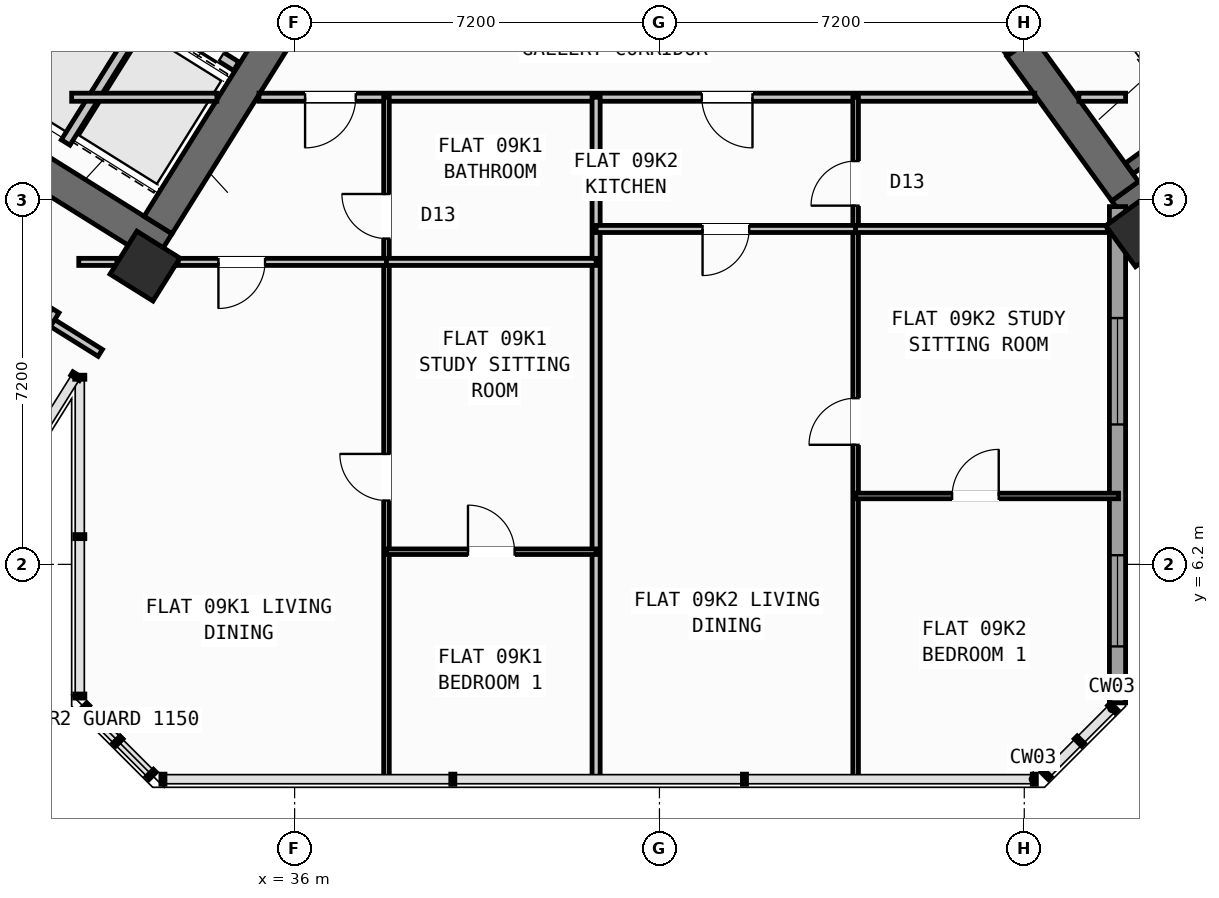
"""IFC4 building model, lengths in metres.
Left out: names, types, materials, properties, quantities, classifications, styles, units other than length and angle.
Written with IfcOpenShell. Run it as: python <this file> out.ifc"""

import sys

from ifc_helpers import new_model, si_unit, direction, frame, frame_2d, origin, origin_2d, place, context, subcontext, project, spatial, rectangle, hollow_rectangle, extrude, source, transform, mapped, element, fill, save


model = new_model("IFC4")
c1 = context("Model", 3, precision=1e-05, world=origin(), true_north=direction((0.0, 1.0)))
c2 = subcontext(c1, "Body", "Model", "MODEL_VIEW")
j1 = project(units=[si_unit("LENGTHUNIT", "METRE"), si_unit("PLANEANGLEUNIT", "RADIAN")], contexts=[c1])
p1 = place(None, origin())
s1 = spatial("IfcSite", under=j1, at=p1, CompositionType="ELEMENT")
p2 = place(p1, origin())
s2 = spatial("IfcBuilding", under=s1, at=p2, CompositionType="ELEMENT")
p3 = place(p2, frame((0.0, 0.0, 38.4)))
s3 = spatial("IfcBuildingStorey", under=s2, at=p3, CompositionType="ELEMENT", Elevation=38.4)
p4 = place(p3, frame((33.409, 12.45, 0.0), z_axis=(0.0, 0.0, 1.0), x_axis=(-0.848051132073, 0.529914405721, 0.0)))
e1 = element("IfcWall", 1, at=p4, inside=s3, PredefinedType="SHEAR", context=c2, shape_type="SweptSolid", body=[
    extrude(rectangle(XDim=13.24, YDim=0.65, at=frame_2d((6.62, 0.0))), origin(), (0.0, 0.0, 1.0), 3.35),
])
p5 = place(p3, frame((36.683, 18.304, 0.0), z_axis=(0.0, 0.0, 1.0), x_axis=(-0.529899109053, -0.848060690178, 0.0)))
e2 = element("IfcWall", 2, at=p5, inside=s3, PredefinedType="SHEAR", context=c2, shape_type="SweptSolid", body=[
    extrude(rectangle(XDim=6.375, YDim=0.65, at=frame_2d((3.188, 0.0))), origin(), (0.0, 0.0, 1.0), 3.35),
])
p6 = place(p3, frame((52.318, 13.11, 0.0), z_axis=(0.0, 0.0, 1.0), x_axis=(0.809019445368, 0.587781878776, 0.0)))
e3 = element("IfcWall", 3, at=p6, inside=s3, PredefinedType="SHEAR", context=c2, shape_type="SweptSolid", body=[
    extrude(rectangle(XDim=12.44, YDim=0.65, at=frame_2d((6.22, 0.0))), origin(), (0.0, 0.0, 1.0), 3.35),
])
p7 = place(p3, frame((52.39, 13.564, 0.0), z_axis=(0.0, 0.0, 1.0), x_axis=(-0.58779688989, 0.809008539037, 0.0)))
e4 = element("IfcWall", 4, at=p7, inside=s3, PredefinedType="SHEAR", context=c2, shape_type="SweptSolid", body=[
    extrude(rectangle(XDim=3.525, YDim=0.65, at=frame_2d((1.763, 0.0))), origin(), (0.0, 0.0, 1.0), 3.35),
])
m1 = source(origin(), c2, "Body", "SweptSolid", [
    extrude(hollow_rectangle(XDim=1.0, YDim=1.0, WallThickness=0.04, at=origin_2d()), origin(), (0.0, 0.0, 1.0), 3.6),
])
for number, where, z_axis, x_axis in (
    (5, (33.046, 12.087, 0.0), (0.0, 0.0, 1.0), (-0.848, 0.53, 0.0)),
    (6, (52.705, 12.773, 0.0), (0.0, 0.0, 1.0), (0.809, 0.588, 0.0)),
):
    element("IfcColumn", number, at=place(p3, frame(where, z_axis=z_axis, x_axis=x_axis)), inside=s3, PredefinedType="COLUMN", context=c2, shape_type="MappedRepresentation", body=[
        mapped(m1, transform((0.0, 0.0, 0.0), scale=1.0)),
    ])
p8 = place(p3, frame((56.581, 7.439, 0.0), z_axis=(0.0, 0.0, 1.0), x_axis=(-0.587785875463, 0.809016541614, 0.0)))
e7 = element("IfcWall", 7, at=p8, inside=s3, PredefinedType="STANDARD", context=c2, shape_type="SweptSolid", body=[
    extrude(rectangle(XDim=6.774, YDim=0.32, at=frame_2d((3.387, 0.0))), origin(), (0.0, 0.0, 1.0), 2.725),
])
p9 = place(p8, frame((1.556, 0.0, 0.8)))
e8 = element("IfcOpeningElement", 8, at=p9, cuts=e7, PredefinedType="OPENING", context=c2, shape_type="SweptSolid", body=[
    extrude(rectangle(XDim=2.1, YDim=1.55, at=frame_2d((1.05, 0.775))), frame((0.0, 0.17, 0.0), z_axis=(0.0, -1.0, 0.0), x_axis=(1.0, 0.0, 0.0)), (0.0, 0.0, 1.0), 0.34),
])
p10 = place(p3, frame((52.24, 13.261, 0.0), z_axis=(0.0, 0.0, 1.0), x_axis=(0.0, -1.0, 0.0)))
e9 = element("IfcWall", 9, at=p10, inside=s3, PredefinedType="STANDARD", context=c2, shape_type="SweptSolid", body=[
    extrude(rectangle(XDim=9.795, YDim=0.32, at=frame_2d((4.897, 0.0))), origin(), (0.0, 0.0, 1.0), 3.35),
])
p11 = place(p10, frame((2.199, 0.0, 0.8)))
e10 = element("IfcOpeningElement", 10, at=p11, cuts=e9, PredefinedType="OPENING", context=c2, shape_type="SweptSolid", body=[
    extrude(rectangle(XDim=2.1, YDim=1.55, at=frame_2d((1.05, 0.775))), frame((0.0, 0.17, 0.0), z_axis=(0.0, -1.0, 0.0), x_axis=(1.0, 0.0, 0.0)), (0.0, 0.0, 1.0), 0.34),
])
p12 = place(p10, frame((6.88, 0.0, 0.85)))
e11 = element("IfcOpeningElement", 11, at=p12, cuts=e9, PredefinedType="OPENING", context=c2, shape_type="SweptSolid", body=[
    extrude(rectangle(XDim=1.8, YDim=1.5, at=frame_2d((0.9, 0.75))), frame((0.0, 0.17, 0.0), z_axis=(0.0, -1.0, 0.0), x_axis=(1.0, 0.0, 0.0)), (0.0, 0.0, 1.0), 0.34),
])
p13 = place(p3, frame((31.288, 18.256, 0.0), z_axis=(0.0, 0.0, 1.0), x_axis=(-0.529943379326, -0.848033026897, 0.0)))
e12 = element("IfcWall", 12, at=p13, inside=s3, PredefinedType="SHEAR", context=c2, shape_type="SweptSolid", body=[
    extrude(rectangle(XDim=3.16, YDim=0.26, at=frame_2d((1.58, 0.0))), origin(), (0.0, 0.0, 1.0), 3.35),
])
p14 = place(p3, frame((34.848, 16.031, 0.0), z_axis=(0.0, 0.0, 1.0), x_axis=(-0.848044042236, 0.529925751807, 0.0)))
e13 = element("IfcWall", 13, at=p14, inside=s3, PredefinedType="STANDARD", context=c2, shape_type="SweptSolid", body=[
    extrude(rectangle(XDim=4.198, YDim=0.2, at=frame_2d((2.099, 0.0))), origin(), (0.0, 0.0, 1.0), 3.34),
])
p15 = place(p14, frame((0.348, 0.0, 0.0)))
e14 = element("IfcOpeningElement", 14, at=p15, cuts=e13, PredefinedType="OPENING", context=c2, shape_type="SweptSolid", body=[
    extrude(rectangle(XDim=1.3, YDim=2.2, at=frame_2d((0.65, 1.1))), frame((0.0, 0.11, 0.0), z_axis=(0.0, -1.0, 0.0), x_axis=(1.0, 0.0, 0.0)), (0.0, 0.0, 1.0), 0.22),
])
p16 = place(p14, frame((2.423, 0.0, 0.0)))
e15 = element("IfcOpeningElement", 15, at=p16, cuts=e13, PredefinedType="OPENING", context=c2, shape_type="SweptSolid", body=[
    extrude(rectangle(XDim=1.45, YDim=2.25, at=frame_2d((0.725, 1.125))), frame((0.0, 0.11, 0.0), z_axis=(0.0, -1.0, 0.0), x_axis=(1.0, 0.0, 0.0)), (0.0, 0.0, 1.0), 0.22),
])
p17 = place(p3, frame((33.029, 17.003, 0.0), z_axis=(0.0, 0.0, 1.0), x_axis=(-0.529916267533, -0.848049968695, 0.0)))
e16 = element("IfcWall", 16, at=p17, inside=s3, PredefinedType="STANDARD", context=c2, shape_type="SweptSolid", body=[
    extrude(rectangle(XDim=2.92, YDim=0.2, at=frame_2d((1.46, 0.0))), origin(), (0.0, 0.0, 1.0), 3.34),
])
p18 = place(p3, frame((52.472, 14.013, 0.0), z_axis=(0.0, 0.0, 1.0), x_axis=(0.809028366311, 0.587769599847, 0.0)))
e17 = element("IfcWall", 17, at=p18, inside=s3, PredefinedType="SHEAR", context=c2, shape_type="SweptSolid", body=[
    extrude(rectangle(XDim=7.33, YDim=0.26, at=frame_2d((3.665, 0.0))), origin(), (0.0, 0.0, 1.0), 3.35),
])
p19 = place(p3, frame((32.164, 10.374, 0.0), z_axis=(0.0, 0.0, 1.0), x_axis=(-0.848044107957, 0.529925646633, 0.0)))
e18 = element("IfcWall", 18, at=p19, inside=s3, PredefinedType="PARTITIONING", context=c2, shape_type="SweptSolid", body=[
    extrude(rectangle(XDim=15.57, YDim=0.16, at=frame_2d((7.785, 0.0))), origin(), (0.0, 0.0, 1.0), 3.34),
])
p20 = place(p19, frame((10.83, 0.0, 0.0)))
e19 = element("IfcOpeningElement", 19, at=p20, cuts=e18, PredefinedType="OPENING", context=c2, shape_type="SweptSolid", body=[
    extrude(rectangle(XDim=1.0, YDim=2.1, at=frame_2d((0.5, 1.05))), frame((0.0, 0.09, 0.0), z_axis=(0.0, -1.0, 0.0), x_axis=(1.0, 0.0, 0.0)), (0.0, 0.0, 1.0), 0.18),
])
p21 = place(p3, frame((31.282, 11.208, 0.0), z_axis=(0.0, 0.0, 1.0), x_axis=(-0.529938869374, -0.84803584519, 0.0)))
e20 = element("IfcWall", 20, at=p21, inside=s3, PredefinedType="PARTITIONING", context=c2, shape_type="SweptSolid", body=[
    extrude(rectangle(XDim=5.48, YDim=0.16, at=frame_2d((2.74, 0.0))), origin(), (0.0, 0.0, 1.0), 3.34),
])
p22 = place(p3, frame((31.6, 15.42, 0.0), z_axis=(0.0, 0.0, 1.0), x_axis=(1.0, 0.0, 0.0)))
e21 = element("IfcWall", 21, at=p22, inside=s3, PredefinedType="PARTITIONING", context=c2, shape_type="SweptSolid", body=[
    extrude(rectangle(XDim=2.866, YDim=0.16, at=frame_2d((1.433, 0.0))), origin(), (0.0, 0.0, 1.0), 3.34),
])
p23 = place(p3, frame((35.296, 15.42, 0.0), z_axis=(0.0, 0.0, 1.0), x_axis=(1.0, 0.0, 0.0)))
e22 = element("IfcWall", 22, at=p23, inside=s3, PredefinedType="PARTITIONING", context=c2, shape_type="SweptSolid", body=[
    extrude(rectangle(XDim=15.311, YDim=0.16, at=frame_2d((7.655, 0.0))), origin(), (0.0, 0.0, 1.0), 3.34),
])
p24 = place(p23, frame((0.91, 0.0, 0.0)))
e23 = element("IfcOpeningElement", 23, at=p24, cuts=e22, PredefinedType="OPENING", context=c2, shape_type="SweptSolid", body=[
    extrude(rectangle(XDim=1.0, YDim=2.1, at=frame_2d((0.5, 1.05))), frame((0.0, 0.09, 0.0), z_axis=(0.0, -1.0, 0.0), x_axis=(1.0, 0.0, 0.0)), (0.0, 0.0, 1.0), 0.18),
])
p25 = place(p23, frame((8.74, 0.0, 0.0)))
e24 = element("IfcOpeningElement", 24, at=p25, cuts=e22, PredefinedType="OPENING", context=c2, shape_type="SweptSolid", body=[
    extrude(rectangle(XDim=1.0, YDim=2.1, at=frame_2d((0.5, 1.05))), frame((0.0, 0.09, 0.0), z_axis=(0.0, -1.0, 0.0), x_axis=(1.0, 0.0, 0.0)), (0.0, 0.0, 1.0), 0.18),
])
p26 = place(p3, frame((51.477, 15.42, 0.0), z_axis=(0.0, 0.0, 1.0), x_axis=(1.0, 0.0, 0.0)))
e25 = element("IfcWall", 25, at=p26, inside=s3, PredefinedType="PARTITIONING", context=c2, shape_type="SweptSolid", body=[
    extrude(rectangle(XDim=0.923, YDim=0.16, at=frame_2d((0.461, 0.0))), origin(), (0.0, 0.0, 1.0), 3.34),
])
p27 = place(p3, frame((50.119, 16.333, 0.0), z_axis=(0.0, 0.0, 1.0), x_axis=(-0.587749856981, 0.809042709391, 0.0)))
e26 = element("IfcWall", 26, at=p27, inside=s3, PredefinedType="STANDARD", context=c2, shape_type="SweptSolid", body=[
    extrude(rectangle(XDim=2.96, YDim=0.2, at=frame_2d((1.48, 0.0))), origin(), (0.0, 0.0, 1.0), 3.34),
])
p28 = place(p27, frame((0.53, 0.0, 0.0)))
e27 = element("IfcOpeningElement", 27, at=p28, cuts=e26, PredefinedType="OPENING", context=c2, shape_type="SweptSolid", body=[
    extrude(rectangle(XDim=1.5, YDim=2.15, at=frame_2d((0.75, 1.075))), frame((0.0, 0.11, 0.0), z_axis=(0.0, -1.0, 0.0), x_axis=(1.0, 0.0, 0.0)), (0.0, 0.0, 1.0), 0.22),
])
p29 = place(p3, frame((41.95, 1.96, 0.0), z_axis=(0.0, 0.0, 1.0), x_axis=(0.0, 1.0, 0.0)))
e28 = element("IfcWall", 28, at=p29, inside=s3, PredefinedType="PARTITIONING", context=c2, shape_type="SweptSolid", body=[
    extrude(rectangle(XDim=13.46, YDim=0.16, at=frame_2d((6.73, 0.0))), origin(), (0.0, 0.0, 1.0), 3.34),
])
p30 = place(p3, frame((37.813, 1.96, 0.0), z_axis=(0.0, 0.0, 1.0), x_axis=(0.0, 1.0, 0.0)))
e29 = element("IfcWall", 29, at=p30, inside=s3, PredefinedType="PARTITIONING", context=c2, shape_type="SweptSolid", body=[
    extrude(rectangle(XDim=13.46, YDim=0.11, at=frame_2d((6.73, 0.0))), origin(), (0.0, 0.0, 1.0), 3.34),
])
p31 = place(p30, frame((5.5, 0.0, 0.0)))
e30 = element("IfcOpeningElement", 30, at=p31, cuts=e29, PredefinedType="OPENING", context=c2, shape_type="SweptSolid", body=[
    extrude(rectangle(XDim=0.92, YDim=2.08, at=frame_2d((0.46, 1.04))), frame((0.0, 0.065, 0.0), z_axis=(0.0, -1.0, 0.0), x_axis=(1.0, 0.0, 0.0)), (0.0, 0.0, 1.0), 0.13),
])
p32 = place(p30, frame((10.67, 0.0, 0.0)))
e31 = element("IfcOpeningElement", 31, at=p32, cuts=e29, PredefinedType="OPENING", context=c2, shape_type="SweptSolid", body=[
    extrude(rectangle(XDim=0.88, YDim=2.08, at=frame_2d((0.44, 1.04))), frame((0.0, 0.065, 0.0), z_axis=(0.0, -1.0, 0.0), x_axis=(1.0, 0.0, 0.0)), (0.0, 0.0, 1.0), 0.13),
])
p33 = place(p3, frame((31.74, 12.17, 0.0), z_axis=(0.0, 0.0, 1.0), x_axis=(1.0, 0.0, 0.0)))
e32 = element("IfcWall", 32, at=p33, inside=s3, PredefinedType="PLUMBINGWALL", context=c2, shape_type="SweptSolid", body=[
    extrude(rectangle(XDim=0.754, YDim=0.14, at=frame_2d((0.377, 0.0))), origin(), (0.0, 0.0, 1.0), 3.34),
])
p34 = place(p3, frame((33.702, 12.17, 0.0), z_axis=(0.0, 0.0, 1.0), x_axis=(1.0, 0.0, 0.0)))
e33 = element("IfcWall", 33, at=p34, inside=s3, PredefinedType="PLUMBINGWALL", context=c2, shape_type="SweptSolid", body=[
    extrude(rectangle(XDim=4.111, YDim=0.14, at=frame_2d((2.056, 0.0))), origin(), (0.0, 0.0, 1.0), 2.525),
])
p35 = place(p34, frame((0.795, 0.0, 0.0)))
e34 = element("IfcOpeningElement", 34, at=p35, cuts=e33, PredefinedType="OPENING", context=c2, shape_type="SweptSolid", body=[
    extrude(rectangle(XDim=0.92, YDim=2.08, at=frame_2d((0.46, 1.04))), frame((0.0, 0.08, 0.0), z_axis=(0.0, -1.0, 0.0), x_axis=(1.0, 0.0, 0.0)), (0.0, 0.0, 1.0), 0.16),
])
p36 = place(p3, frame((37.813, 12.17, 0.0), z_axis=(0.0, 0.0, 1.0), x_axis=(1.0, 0.0, 0.0)))
e35 = element("IfcWall", 35, at=p36, inside=s3, PredefinedType="PLUMBINGWALL", context=c2, shape_type="SweptSolid", body=[
    extrude(rectangle(XDim=4.137, YDim=0.14, at=frame_2d((2.068, 0.0))), origin(), (0.0, 0.0, 1.0), 2.525),
])
p37 = place(p3, frame((37.813, 6.45, 0.0), z_axis=(0.0, 0.0, 1.0), x_axis=(1.0, 0.0, 0.0)))
e36 = element("IfcWall", 36, at=p37, inside=s3, PredefinedType="PARTITIONING", context=c2, shape_type="SweptSolid", body=[
    extrude(rectangle(XDim=4.137, YDim=0.11, at=frame_2d((2.068, 0.0))), origin(), (0.0, 0.0, 1.0), 3.34),
])
p38 = place(p37, frame((1.608, 0.0, 0.0)))
e37 = element("IfcOpeningElement", 37, at=p38, cuts=e36, PredefinedType="OPENING", context=c2, shape_type="SweptSolid", body=[
    extrude(rectangle(XDim=0.92, YDim=2.08, at=frame_2d((0.46, 1.04))), frame((0.0, 0.065, 0.0), z_axis=(0.0, -1.0, 0.0), x_axis=(1.0, 0.0, 0.0)), (0.0, 0.0, 1.0), 0.13),
])
p39 = place(p3, frame((47.072, 1.96, 0.0), z_axis=(0.0, 0.0, 1.0), x_axis=(0.0, 1.0, 0.0)))
e38 = element("IfcWall", 38, at=p39, inside=s3, PredefinedType="PARTITIONING", context=c2, shape_type="SweptSolid", body=[
    extrude(rectangle(XDim=13.46, YDim=0.11, at=frame_2d((6.73, 0.0))), origin(), (0.0, 0.0, 1.0), 3.34),
])
p40 = place(p39, frame((6.6, 0.0, 0.0)))
e39 = element("IfcOpeningElement", 39, at=p40, cuts=e38, PredefinedType="OPENING", context=c2, shape_type="SweptSolid", body=[
    extrude(rectangle(XDim=0.92, YDim=2.08, at=frame_2d((0.46, 1.04))), frame((0.0, 0.065, 0.0), z_axis=(0.0, -1.0, 0.0), x_axis=(1.0, 0.0, 0.0)), (0.0, 0.0, 1.0), 0.13),
])
p41 = place(p39, frame((11.32, 0.0, 0.0)))
e40 = element("IfcOpeningElement", 40, at=p41, cuts=e38, PredefinedType="OPENING", context=c2, shape_type="SweptSolid", body=[
    extrude(rectangle(XDim=0.88, YDim=2.08, at=frame_2d((0.44, 1.04))), frame((0.0, 0.065, 0.0), z_axis=(0.0, -1.0, 0.0), x_axis=(1.0, 0.0, 0.0)), (0.0, 0.0, 1.0), 0.13),
])
p42 = place(p3, frame((41.95, 12.82, 0.0), z_axis=(0.0, 0.0, 1.0), x_axis=(1.0, 0.0, 0.0)))
e41 = element("IfcWall", 41, at=p42, inside=s3, PredefinedType="PLUMBINGWALL", context=c2, shape_type="SweptSolid", body=[
    extrude(rectangle(XDim=5.122, YDim=0.14, at=frame_2d((2.561, 0.0))), origin(), (0.0, 0.0, 1.0), 2.525),
])
p43 = place(p42, frame((2.101, 0.0, 0.0)))
e42 = element("IfcOpeningElement", 42, at=p43, cuts=e41, PredefinedType="OPENING", context=c2, shape_type="SweptSolid", body=[
    extrude(rectangle(XDim=0.92, YDim=2.08, at=frame_2d((0.46, 1.04))), frame((0.0, 0.08, 0.0), z_axis=(0.0, -1.0, 0.0), x_axis=(1.0, 0.0, 0.0)), (0.0, 0.0, 1.0), 0.16),
])
p44 = place(p3, frame((47.072, 12.82, 0.0), z_axis=(0.0, 0.0, 1.0), x_axis=(1.0, 0.0, 0.0)))
e43 = element("IfcWall", 43, at=p44, inside=s3, PredefinedType="PLUMBINGWALL", context=c2, shape_type="SweptSolid", body=[
    extrude(rectangle(XDim=4.967, YDim=0.14, at=frame_2d((2.483, 0.0))), origin(), (0.0, 0.0, 1.0), 2.525),
])
p45 = place(p3, frame((47.072, 7.55, 0.0), z_axis=(0.0, 0.0, 1.0), x_axis=(1.0, 0.0, 0.0)))
e44 = element("IfcWall", 44, at=p45, inside=s3, PredefinedType="PARTITIONING", context=c2, shape_type="SweptSolid", body=[
    extrude(rectangle(XDim=5.188, YDim=0.11, at=frame_2d((2.594, 0.0))), origin(), (0.0, 0.0, 1.0), 3.34),
])
p46 = place(p45, frame((1.904, 0.0, 0.0)))
e45 = element("IfcOpeningElement", 45, at=p46, cuts=e44, PredefinedType="OPENING", context=c2, shape_type="SweptSolid", body=[
    extrude(rectangle(XDim=0.92, YDim=2.08, at=frame_2d((0.46, 1.04))), frame((0.0, 0.065, 0.0), z_axis=(0.0, -1.0, 0.0), x_axis=(1.0, 0.0, 0.0)), (0.0, 0.0, 1.0), 0.13),
])
m2 = source(origin(), c2, "Body", "SweptSolid", [
    extrude(rectangle(XDim=2.1, YDim=1.55, at=frame_2d((1.05, 0.775))), frame((0.0, 0.03, 0.0), z_axis=(0.0, -1.0, 0.0), x_axis=(1.0, 0.0, 0.0)), (0.0, 0.0, 1.0), 0.06),
])
p47 = place(p11, origin())
e46 = element("IfcWindow", 46, at=p47, inside=s3, PartitioningType="SINGLE_PANEL", PredefinedType="WINDOW", context=c2, shape_type="MappedRepresentation", body=[
    mapped(m2, transform((0.0, 0.0, 0.0), scale=1.0)),
])
fill(e10, e46)
m3 = source(origin(), c2, "Body", "SweptSolid", [
    extrude(rectangle(XDim=1.8, YDim=1.5, at=frame_2d((0.9, 0.75))), frame((0.0, 0.03, 0.0), z_axis=(0.0, -1.0, 0.0), x_axis=(1.0, 0.0, 0.0)), (0.0, 0.0, 1.0), 0.06),
])
p48 = place(p12, origin())
e47 = element("IfcWindow", 47, at=p48, inside=s3, PartitioningType="SINGLE_PANEL", PredefinedType="WINDOW", context=c2, shape_type="MappedRepresentation", body=[
    mapped(m3, transform((0.0, 0.0, 0.0), scale=1.0)),
])
fill(e11, e47)
m4 = source(origin(), c2, "Body", "SweptSolid", [
    extrude(rectangle(XDim=1.3, YDim=2.2, at=frame_2d((0.65, 1.1))), frame((0.0, 0.025, 0.0), z_axis=(0.0, -1.0, 0.0), x_axis=(1.0, 0.0, 0.0)), (0.0, 0.0, 1.0), 0.05),
])
p49 = place(p15, origin())
e48 = element("IfcDoor", 48, at=p49, inside=s3, OperationType="DOUBLE_DOOR_SLIDING", PredefinedType="DOOR", context=c2, shape_type="MappedRepresentation", body=[
    mapped(m4, transform((0.0, 0.0, 0.0), scale=1.0)),
])
fill(e14, e48)
m5 = source(origin(), c2, "Body", "SweptSolid", [
    extrude(rectangle(XDim=0.92, YDim=2.08, at=frame_2d((0.46, 1.04))), frame((0.0, 0.025, 0.0), z_axis=(0.0, -1.0, 0.0), x_axis=(1.0, 0.0, 0.0)), (0.0, 0.0, 1.0), 0.05),
])
p50 = place(p31, origin())
e49 = element("IfcDoor", 49, at=p50, inside=s3, OperationType="SINGLE_SWING_RIGHT", PredefinedType="DOOR", context=c2, shape_type="MappedRepresentation", body=[
    mapped(m5, transform((0.0, 0.0, 0.0), scale=1.0)),
])
fill(e30, e49)
p51 = place(p38, origin())
e50 = element("IfcDoor", 50, at=p51, inside=s3, OperationType="SINGLE_SWING_LEFT", PredefinedType="DOOR", context=c2, shape_type="MappedRepresentation", body=[
    mapped(m5, transform((0.0, 0.0, 0.0), scale=1.0)),
])
fill(e37, e50)
m6 = source(origin(), c2, "Body", "SweptSolid", [
    extrude(rectangle(XDim=1.0, YDim=2.1, at=frame_2d((0.5, 1.05))), frame((0.0, 0.025, 0.0), z_axis=(0.0, -1.0, 0.0), x_axis=(1.0, 0.0, 0.0)), (0.0, 0.0, 1.0), 0.05),
])
p52 = place(p24, frame((1.0, 0.0, 0.0), z_axis=(0.0, 0.0, 1.0), x_axis=(-1.0, 0.0, 0.0)))
e51 = element("IfcDoor", 51, at=p52, inside=s3, OperationType="SINGLE_SWING_RIGHT", PredefinedType="DOOR", context=c2, shape_type="MappedRepresentation", body=[
    mapped(m6, transform((0.0, 0.0, 0.0), scale=1.0)),
])
fill(e23, e51)
p53 = place(p35, frame((0.92, 0.0, 0.0), z_axis=(0.0, 0.0, 1.0), x_axis=(-1.0, 0.0, 0.0)))
e52 = element("IfcDoor", 52, at=p53, inside=s3, OperationType="SINGLE_SWING_RIGHT", PredefinedType="DOOR", context=c2, shape_type="MappedRepresentation", body=[
    mapped(m5, transform((0.0, 0.0, 0.0), scale=1.0)),
])
fill(e34, e52)
m7 = source(origin(), c2, "Body", "SweptSolid", [
    extrude(rectangle(XDim=0.88, YDim=2.08, at=frame_2d((0.44, 1.04))), frame((0.0, 0.025, 0.0), z_axis=(0.0, -1.0, 0.0), x_axis=(1.0, 0.0, 0.0)), (0.0, 0.0, 1.0), 0.05),
])
p54 = place(p32, origin())
e53 = element("IfcDoor", 53, at=p54, inside=s3, OperationType="SINGLE_SWING_RIGHT", PredefinedType="DOOR", context=c2, shape_type="MappedRepresentation", body=[
    mapped(m7, transform((0.0, 0.0, 0.0), scale=1.0)),
])
fill(e31, e53)
p55 = place(p40, origin())
e54 = element("IfcDoor", 54, at=p55, inside=s3, OperationType="SINGLE_SWING_LEFT", PredefinedType="DOOR", context=c2, shape_type="MappedRepresentation", body=[
    mapped(m5, transform((0.0, 0.0, 0.0), scale=1.0)),
])
fill(e39, e54)
p56 = place(p46, origin())
e55 = element("IfcDoor", 55, at=p56, inside=s3, OperationType="SINGLE_SWING_RIGHT", PredefinedType="DOOR", context=c2, shape_type="MappedRepresentation", body=[
    mapped(m5, transform((0.0, 0.0, 0.0), scale=1.0)),
])
fill(e45, e55)
p57 = place(p25, frame((1.0, 0.0, 0.0), z_axis=(0.0, 0.0, 1.0), x_axis=(-1.0, 0.0, 0.0)))
e56 = element("IfcDoor", 56, at=p57, inside=s3, OperationType="SINGLE_SWING_LEFT", PredefinedType="DOOR", context=c2, shape_type="MappedRepresentation", body=[
    mapped(m6, transform((0.0, 0.0, 0.0), scale=1.0)),
])
fill(e24, e56)
p58 = place(p43, frame((0.92, 0.0, 0.0), z_axis=(0.0, 0.0, 1.0), x_axis=(-1.0, 0.0, 0.0)))
e57 = element("IfcDoor", 57, at=p58, inside=s3, OperationType="SINGLE_SWING_RIGHT", PredefinedType="DOOR", context=c2, shape_type="MappedRepresentation", body=[
    mapped(m5, transform((0.0, 0.0, 0.0), scale=1.0)),
])
fill(e42, e57)
p59 = place(p41, origin())
e58 = element("IfcDoor", 58, at=p59, inside=s3, OperationType="SINGLE_SWING_LEFT", PredefinedType="DOOR", context=c2, shape_type="MappedRepresentation", body=[
    mapped(m7, transform((0.0, 0.0, 0.0), scale=1.0)),
])
fill(e40, e58)
save(model, sys.argv[1])
